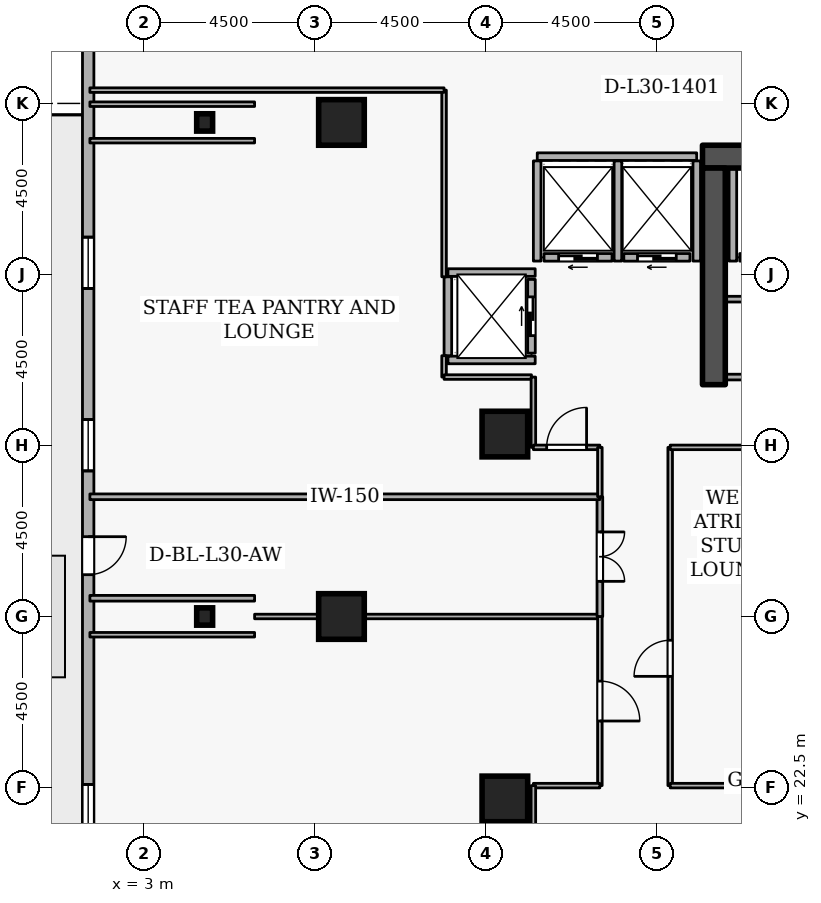
"""IFC4 building model, lengths in metres.
Left out: names, types, materials, properties, quantities, classifications, styles, units other than length and angle.
Written with IfcOpenShell. Run it as: python <this file> out.ifc"""

import sys

from ifc_helpers import new_model, si_unit, direction, frame, frame_2d, origin, origin_2d, place, context, subcontext, project, spatial, rectangle, i_section, extrude, element, fill, save


model = new_model("IFC4")
c1 = context("Model", 3, precision=1e-05, world=origin(), true_north=direction((0.0, 1.0)))
c2 = subcontext(c1, "Body", "Model", "MODEL_VIEW")
j1 = project(units=[si_unit("LENGTHUNIT", "METRE"), si_unit("PLANEANGLEUNIT", "RADIAN")], contexts=[c1])
p1 = place(None, origin())
s1 = spatial("IfcSite", under=j1, at=p1, CompositionType="ELEMENT")
p2 = place(p1, origin())
s2 = spatial("IfcBuilding", under=s1, at=p2, CompositionType="ELEMENT")
p3 = place(p2, frame((0.0, 0.0, 116.1)))
s3 = spatial("IfcBuildingStorey", under=s2, at=p3, CompositionType="ELEMENT", Elevation=116.1)
p4 = place(p3, frame((17.7, 39.1, 0.0), z_axis=(0.0, 0.0, 1.0), x_axis=(1.0, 0.0, 0.0)))
e1 = element("IfcWall", 1, at=p4, inside=s3, PredefinedType="SHEAR", context=c2, shape_type="SweptSolid", body=[
    extrude(rectangle(XDim=15.6, YDim=0.6, at=frame_2d((7.8, 0.0))), origin(), (0.0, 0.0, 1.0), 3.6),
])
p5 = place(p3, frame((18.0, 33.1, 0.0), z_axis=(0.0, 0.0, 1.0), x_axis=(0.0, 1.0, 0.0)))
e2 = element("IfcWall", 2, at=p5, inside=s3, PredefinedType="SHEAR", context=c2, shape_type="SweptSolid", body=[
    extrude(rectangle(XDim=5.7, YDim=0.6, at=frame_2d((2.85, 0.0))), origin(), (0.0, 0.0, 1.0), 3.6),
])
for number, where, z_axis, x_axis in (
    (3, (8.2, 27.0, 0.0), (0.0, 0.0, 1.0), (1.0, 0.0, 0.0)),
    (4, (8.2, 40.0, 0.0), (0.0, 0.0, 1.0), (1.0, 0.0, 0.0)),
    (5, (12.5, 22.2, 0.0), (0.0, 0.0, 1.0), (1.0, 0.0, 0.0)),
    (6, (12.5, 31.8, 0.0), (0.0, 0.0, 1.0), (1.0, 0.0, 0.0)),
):
    element("IfcColumn", number, at=place(p3, frame(where, z_axis=z_axis, x_axis=x_axis)), inside=s3, PredefinedType="COLUMN", context=c2, shape_type="SweptSolid", body=[
        extrude(rectangle(XDim=1.2, YDim=1.2, at=origin_2d()), origin(), (0.0, 0.0, 1.0), 3.6),
    ])
for number, where, z_axis, x_axis in (
    (7, (4.6, 27.0, 0.0), (0.0, 0.0, 1.0), (1.0, 0.0, 0.0)),
    (8, (4.6, 40.0, 0.0), (0.0, 0.0, 1.0), (1.0, 0.0, 0.0)),
):
    element("IfcColumn", number, at=place(p3, frame(where, z_axis=z_axis, x_axis=x_axis)), inside=s3, PredefinedType="COLUMN", context=c2, shape_type="SweptSolid", body=[
        extrude(i_section(OverallWidth=0.418, OverallDepth=0.456, WebThickness=0.042, FlangeThickness=0.067, FilletRadius=0.015, at=origin_2d()), origin(), (0.0, 0.0, 1.0), 3.6),
    ])
p6 = place(p3, frame((1.535, 48.381, 0.0), z_axis=(0.0, 0.0, 1.0), x_axis=(0.0, -1.0, 0.0)))
e9 = element("IfcWall", 9, at=p6, inside=s3, PredefinedType="STANDARD", context=c2, shape_type="SweptSolid", body=[
    extrude(rectangle(XDim=36.763, YDim=0.3, at=frame_2d((18.381, 0.0))), origin(), (0.0, 0.0, 1.0), 2.22),
])
p7 = place(p6, frame((19.281, 0.0, 0.0)))
e10 = element("IfcOpeningElement", 10, at=p7, cuts=e9, PredefinedType="OPENING", context=c2, shape_type="SweptSolid", body=[
    extrude(rectangle(XDim=1.0, YDim=2.08, at=frame_2d((0.5, 1.04))), frame((0.0, 0.16, 0.0), z_axis=(0.0, -1.0, 0.0), x_axis=(1.0, 0.0, 0.0)), (0.0, 0.0, 1.0), 0.32),
])
p8 = place(p6, frame((1.8, 0.0, 0.72)))
e11 = element("IfcOpeningElement", 11, at=p8, cuts=e9, PredefinedType="OPENING", context=c2, shape_type="SweptSolid", body=[
    extrude(rectangle(XDim=1.35, YDim=1.05, at=frame_2d((0.675, 0.525))), frame((0.0, 0.16, 0.0), z_axis=(0.0, -1.0, 0.0), x_axis=(1.0, 0.0, 0.0)), (0.0, 0.0, 1.0), 0.32),
])
p9 = place(p6, frame((11.4, 0.0, 0.72)))
e12 = element("IfcOpeningElement", 12, at=p9, cuts=e9, PredefinedType="OPENING", context=c2, shape_type="SweptSolid", body=[
    extrude(rectangle(XDim=1.35, YDim=1.05, at=frame_2d((0.675, 0.525))), frame((0.0, 0.16, 0.0), z_axis=(0.0, -1.0, 0.0), x_axis=(1.0, 0.0, 0.0)), (0.0, 0.0, 1.0), 0.32),
])
p10 = place(p6, frame((16.2, 0.0, 0.72)))
e13 = element("IfcOpeningElement", 13, at=p10, cuts=e9, PredefinedType="OPENING", context=c2, shape_type="SweptSolid", body=[
    extrude(rectangle(XDim=1.35, YDim=1.05, at=frame_2d((0.675, 0.525))), frame((0.0, 0.16, 0.0), z_axis=(0.0, -1.0, 0.0), x_axis=(1.0, 0.0, 0.0)), (0.0, 0.0, 1.0), 0.32),
])
p11 = place(p6, frame((25.8, 0.0, 0.72)))
e14 = element("IfcOpeningElement", 14, at=p11, cuts=e9, PredefinedType="OPENING", context=c2, shape_type="SweptSolid", body=[
    extrude(rectangle(XDim=1.35, YDim=1.05, at=frame_2d((0.675, 0.525))), frame((0.0, 0.16, 0.0), z_axis=(0.0, -1.0, 0.0), x_axis=(1.0, 0.0, 0.0)), (0.0, 0.0, 1.0), 0.32),
])
p12 = place(p6, frame((30.6, 0.0, 0.72)))
e15 = element("IfcOpeningElement", 15, at=p12, cuts=e9, PredefinedType="OPENING", context=c2, shape_type="SweptSolid", body=[
    extrude(rectangle(XDim=1.35, YDim=1.05, at=frame_2d((0.675, 0.525))), frame((0.0, 0.16, 0.0), z_axis=(0.0, -1.0, 0.0), x_axis=(1.0, 0.0, 0.0)), (0.0, 0.0, 1.0), 0.32),
])
p13 = place(p3, frame((20.62, 36.45, 0.0), z_axis=(0.0, 0.0, 1.0), x_axis=(-1.0, 0.0, 0.0)))
e16 = element("IfcWall", 16, at=p13, inside=s3, PredefinedType="STANDARD", context=c2, shape_type="SweptSolid", body=[
    extrude(rectangle(XDim=1.94, YDim=0.2, at=frame_2d((0.97, 0.0))), origin(), (0.0, 0.0, 1.0), 3.32),
])
p14 = place(p3, frame((17.37, 36.45, 0.0), z_axis=(0.0, 0.0, 1.0), x_axis=(-1.0, 0.0, 0.0)))
e17 = element("IfcWall", 17, at=p14, inside=s3, PredefinedType="STANDARD", context=c2, shape_type="SweptSolid", body=[
    extrude(rectangle(XDim=1.74, YDim=0.2, at=frame_2d((0.87, 0.0))), origin(), (0.0, 0.0, 1.0), 3.32),
])
p15 = place(p14, frame((0.36, 0.0, 0.0)))
e18 = element("IfcOpeningElement", 18, at=p15, cuts=e17, PredefinedType="OPENING", context=c2, shape_type="SweptSolid", body=[
    extrude(rectangle(XDim=1.02, YDim=2.06, at=frame_2d((0.51, 1.03))), frame((0.0, 0.11, 0.0), z_axis=(0.0, -1.0, 0.0), x_axis=(1.0, 0.0, 0.0)), (0.0, 0.0, 1.0), 0.22),
])
p16 = place(p3, frame((15.32, 36.45, 0.0), z_axis=(0.0, 0.0, 1.0), x_axis=(-1.0, 0.0, 0.0)))
e19 = element("IfcWall", 19, at=p16, inside=s3, PredefinedType="STANDARD", context=c2, shape_type="SweptSolid", body=[
    extrude(rectangle(XDim=1.79, YDim=0.2, at=frame_2d((0.895, 0.0))), origin(), (0.0, 0.0, 1.0), 3.32),
])
p17 = place(p16, frame((0.385, 0.0, 0.0)))
e20 = element("IfcOpeningElement", 20, at=p17, cuts=e19, PredefinedType="OPENING", context=c2, shape_type="SweptSolid", body=[
    extrude(rectangle(XDim=1.02, YDim=2.06, at=frame_2d((0.51, 1.03))), frame((0.0, 0.11, 0.0), z_axis=(0.0, -1.0, 0.0), x_axis=(1.0, 0.0, 0.0)), (0.0, 0.0, 1.0), 0.22),
])
p18 = place(p3, frame((13.2, 33.93, 0.0), z_axis=(0.0, 0.0, 1.0), x_axis=(0.0, 1.0, 0.0)))
e21 = element("IfcWall", 21, at=p18, inside=s3, PredefinedType="STANDARD", context=c2, shape_type="SweptSolid", body=[
    extrude(rectangle(XDim=1.94, YDim=0.2, at=frame_2d((0.97, 0.0))), origin(), (0.0, 0.0, 1.0), 3.32),
])
p19 = place(p18, frame((0.46, 0.0, 0.0)))
e22 = element("IfcOpeningElement", 22, at=p19, cuts=e21, PredefinedType="OPENING", context=c2, shape_type="SweptSolid", body=[
    extrude(rectangle(XDim=1.02, YDim=2.06, at=frame_2d((0.51, 1.03))), frame((0.0, 0.11, 0.0), z_axis=(0.0, -1.0, 0.0), x_axis=(1.0, 0.0, 0.0)), (0.0, 0.0, 1.0), 0.22),
])
p20 = place(p3, frame((18.5, 36.352, 0.0), z_axis=(0.0, 0.0, 1.0), x_axis=(0.0, 1.0, 0.0)))
e23 = element("IfcWall", 23, at=p20, inside=s3, PredefinedType="STANDARD", context=c2, shape_type="SweptSolid", body=[
    extrude(rectangle(XDim=2.436, YDim=0.2, at=frame_2d((1.218, 0.0))), origin(), (0.0, 0.0, 1.0), 3.32),
])
p21 = place(p3, frame((13.352, 39.1, 0.0), z_axis=(0.0, 0.0, 1.0), x_axis=(1.0, 0.0, 0.0)))
e24 = element("IfcWall", 24, at=p21, inside=s3, PredefinedType="STANDARD", context=c2, shape_type="SweptSolid", body=[
    extrude(rectangle(XDim=4.196, YDim=0.2, at=frame_2d((2.098, 0.0))), origin(), (0.0, 0.0, 1.0), 3.32),
])
p22 = place(p3, frame((17.55, 36.352, 0.0), z_axis=(0.0, 0.0, 1.0), x_axis=(0.0, 1.0, 0.0)))
e25 = element("IfcWall", 25, at=p22, inside=s3, PredefinedType="STANDARD", context=c2, shape_type="SweptSolid", body=[
    extrude(rectangle(XDim=2.636, YDim=0.2, at=frame_2d((1.318, 0.0))), origin(), (0.0, 0.0, 1.0), 2.525),
])
for number, where, z_axis, x_axis in (
    (26, (15.475, 36.352, 0.0), (0.0, 0.0, 1.0), (0.0, 1.0, 0.0)),
    (27, (13.35, 36.352, 0.0), (0.0, 0.0, 1.0), (0.0, 1.0, 0.0)),
):
    element("IfcWall", number, at=place(p3, frame(where, z_axis=z_axis, x_axis=x_axis)), inside=s3, PredefinedType="STANDARD", context=c2, shape_type="SweptSolid", body=[
        extrude(rectangle(XDim=2.636, YDim=0.2, at=frame_2d((1.318, 0.0))), origin(), (0.0, 0.0, 1.0), 3.32),
    ])
for number, where, z_axis, x_axis in (
    (28, (11.002, 36.05, 0.0), (0.0, 0.0, 1.0), (1.0, 0.0, 0.0)),
    (29, (11.002, 33.75, 0.0), (0.0, 0.0, 1.0), (1.0, 0.0, 0.0)),
):
    element("IfcWall", number, at=place(p3, frame(where, z_axis=z_axis, x_axis=x_axis)), inside=s3, PredefinedType="STANDARD", context=c2, shape_type="SweptSolid", body=[
        extrude(rectangle(XDim=2.296, YDim=0.2, at=frame_2d((1.148, 0.0))), origin(), (0.0, 0.0, 1.0), 3.32),
    ])
p23 = place(p3, frame((11.0, 33.862, 0.0), z_axis=(0.0, 0.0, 1.0), x_axis=(0.0, 1.0, 0.0)))
e30 = element("IfcWall", 30, at=p23, inside=s3, PredefinedType="STANDARD", context=c2, shape_type="SweptSolid", body=[
    extrude(rectangle(XDim=2.076, YDim=0.2, at=frame_2d((1.038, 0.0))), origin(), (0.0, 0.0, 1.0), 3.32),
])
p24 = place(p3, frame((18.3, 33.3, 0.0), z_axis=(0.0, 0.0, 1.0), x_axis=(1.0, 0.0, 0.0)))
e31 = element("IfcWall", 31, at=p24, inside=s3, PredefinedType="PARTITIONING", context=c2, shape_type="SweptSolid", body=[
    extrude(rectangle(XDim=3.3, YDim=0.15, at=frame_2d((1.65, 0.0))), origin(), (0.0, 0.0, 1.0), 3.32),
])
p25 = place(p24, frame((1.19, 0.0, 0.0)))
e32 = element("IfcOpeningElement", 32, at=p25, cuts=e31, PredefinedType="OPENING", context=c2, shape_type="SweptSolid", body=[
    extrude(rectangle(XDim=0.92, YDim=2.08, at=frame_2d((0.46, 1.04))), frame((0.0, 0.085, 0.0), z_axis=(0.0, -1.0, 0.0), x_axis=(1.0, 0.0, 0.0)), (0.0, 0.0, 1.0), 0.17),
])
p26 = place(p3, frame((21.6, 35.35, 0.0), z_axis=(0.0, 0.0, 1.0), x_axis=(-1.0, 0.0, 0.0)))
e33 = element("IfcWall", 33, at=p26, inside=s3, PredefinedType="PARTITIONING", context=c2, shape_type="SweptSolid", body=[
    extrude(rectangle(XDim=3.3, YDim=0.15, at=frame_2d((1.65, 0.0))), origin(), (0.0, 0.0, 1.0), 3.32),
])
p27 = place(p3, frame((1.58, 26.52, 0.0), z_axis=(0.0, 0.0, 1.0), x_axis=(1.0, 0.0, 0.0)))
e34 = element("IfcWall", 34, at=p27, inside=s3, PredefinedType="PARTITIONING", context=c2, shape_type="SweptSolid", body=[
    extrude(rectangle(XDim=4.334, YDim=0.12, at=frame_2d((2.167, 0.0))), origin(), (0.0, 0.0, 1.0), 1.685),
])
p28 = place(p3, frame((5.914, 27.0, 0.0), z_axis=(0.0, 0.0, 1.0), x_axis=(1.0, 0.0, 0.0)))
e35 = element("IfcWall", 35, at=p28, inside=s3, PredefinedType="PARTITIONING", context=c2, shape_type="SweptSolid", body=[
    extrude(rectangle(XDim=9.086, YDim=0.12, at=frame_2d((4.543, 0.0))), origin(), (0.0, 0.0, 1.0), 1.685),
])
p29 = place(p3, frame((15.0, 27.0, 0.0), z_axis=(0.0, 0.0, 1.0), x_axis=(0.0, -1.0, 0.0)))
e36 = element("IfcWall", 36, at=p29, inside=s3, PredefinedType="PARTITIONING", context=c2, shape_type="SweptSolid", body=[
    extrude(rectangle(XDim=4.45, YDim=0.12, at=frame_2d((2.225, 0.0))), origin(), (0.0, 0.0, 1.0), 3.32),
])
p30 = place(p29, frame((1.7, 0.0, 0.0)))
e37 = element("IfcOpeningElement", 37, at=p30, cuts=e36, PredefinedType="OPENING", context=c2, shape_type="SweptSolid", body=[
    extrude(rectangle(XDim=1.05, YDim=2.1, at=frame_2d((0.525, 1.05))), frame((0.0, 0.07, 0.0), z_axis=(0.0, -1.0, 0.0), x_axis=(1.0, 0.0, 0.0)), (0.0, 0.0, 1.0), 0.14),
])
p31 = place(p3, frame((15.0, 22.55, 0.0), z_axis=(0.0, 0.0, 1.0), x_axis=(-1.0, 0.0, 0.0)))
e38 = element("IfcWall", 38, at=p31, inside=s3, PredefinedType="PARTITIONING", context=c2, shape_type="SweptSolid", body=[
    extrude(rectangle(XDim=1.75, YDim=0.12, at=frame_2d((0.875, 0.0))), origin(), (0.0, 0.0, 1.0), 3.32),
])
p32 = place(p3, frame((13.25, 22.55, 0.0), z_axis=(0.0, 0.0, 1.0), x_axis=(0.0, -1.0, 0.0)))
e39 = element("IfcWall", 39, at=p32, inside=s3, PredefinedType="PARTITIONING", context=c2, shape_type="SweptSolid", body=[
    extrude(rectangle(XDim=1.85, YDim=0.12, at=frame_2d((0.925, 0.0))), origin(), (0.0, 0.0, 1.0), 3.32),
])
p33 = place(p3, frame((15.0, 30.15, 0.0), z_axis=(0.0, 0.0, 1.0), x_axis=(0.0, -1.0, 0.0)))
e40 = element("IfcWall", 40, at=p33, inside=s3, PredefinedType="PARTITIONING", context=c2, shape_type="SweptSolid", body=[
    extrude(rectangle(XDim=3.15, YDim=0.15, at=frame_2d((1.575, 0.0))), origin(), (0.0, 0.0, 1.0), 3.32),
])
p34 = place(p33, frame((0.925, 0.0, 0.0)))
e41 = element("IfcOpeningElement", 41, at=p34, cuts=e40, PredefinedType="OPENING", context=c2, shape_type="SweptSolid", body=[
    extrude(rectangle(XDim=1.3, YDim=2.12, at=frame_2d((0.65, 1.06))), frame((0.0, 0.085, 0.0), z_axis=(0.0, -1.0, 0.0), x_axis=(1.0, 0.0, 0.0)), (0.0, 0.0, 1.0), 0.17),
])
p35 = place(p3, frame((5.914, 27.48, 0.0), z_axis=(0.0, 0.0, 1.0), x_axis=(-1.0, 0.0, 0.0)))
e42 = element("IfcWall", 42, at=p35, inside=s3, PredefinedType="PARTITIONING", context=c2, shape_type="SweptSolid", body=[
    extrude(rectangle(XDim=4.334, YDim=0.15, at=frame_2d((2.167, 0.0))), origin(), (0.0, 0.0, 1.0), 1.685),
])
p36 = place(p3, frame((1.58, 30.15, 0.0), z_axis=(0.0, 0.0, 1.0), x_axis=(1.0, 0.0, 0.0)))
e43 = element("IfcWall", 43, at=p36, inside=s3, PredefinedType="PARTITIONING", context=c2, shape_type="SweptSolid", body=[
    extrude(rectangle(XDim=13.42, YDim=0.15, at=frame_2d((6.71, 0.0))), origin(), (0.0, 0.0, 1.0), 3.32),
])
p37 = place(p3, frame((10.9, 40.85, 0.0), z_axis=(0.0, 0.0, 1.0), x_axis=(0.0, -1.0, 0.0)))
e44 = element("IfcWall", 44, at=p37, inside=s3, PredefinedType="PARTITIONING", context=c2, shape_type="SweptSolid", body=[
    extrude(rectangle(XDim=4.912, YDim=0.12, at=frame_2d((2.456, 0.0))), origin(), (0.0, 0.0, 1.0), 3.32),
])
p38 = place(p3, frame((10.9, 33.862, 0.0), z_axis=(0.0, 0.0, 1.0), x_axis=(0.0, -1.0, 0.0)))
e45 = element("IfcWall", 45, at=p38, inside=s3, PredefinedType="PARTITIONING", context=c2, shape_type="SweptSolid", body=[
    extrude(rectangle(XDim=0.562, YDim=0.12, at=frame_2d((0.281, 0.0))), origin(), (0.0, 0.0, 1.0), 3.32),
])
p39 = place(p3, frame((10.9, 33.3, 0.0), z_axis=(0.0, 0.0, 1.0), x_axis=(1.0, 0.0, 0.0)))
e46 = element("IfcWall", 46, at=p39, inside=s3, PredefinedType="PARTITIONING", context=c2, shape_type="SweptSolid", body=[
    extrude(rectangle(XDim=2.3, YDim=0.12, at=frame_2d((1.15, 0.0))), origin(), (0.0, 0.0, 1.0), 3.32),
])
p40 = place(p3, frame((13.25, 33.3, 0.0), z_axis=(0.0, 0.0, 1.0), x_axis=(0.0, -1.0, 0.0)))
e47 = element("IfcWall", 47, at=p40, inside=s3, PredefinedType="PARTITIONING", context=c2, shape_type="SweptSolid", body=[
    extrude(rectangle(XDim=1.85, YDim=0.12, at=frame_2d((0.925, 0.0))), origin(), (0.0, 0.0, 1.0), 3.32),
])
p41 = place(p3, frame((13.25, 31.45, 0.0), z_axis=(0.0, 0.0, 1.0), x_axis=(1.0, 0.0, 0.0)))
e48 = element("IfcWall", 48, at=p41, inside=s3, PredefinedType="PARTITIONING", context=c2, shape_type="SweptSolid", body=[
    extrude(rectangle(XDim=1.75, YDim=0.12, at=frame_2d((0.875, 0.0))), origin(), (0.0, 0.0, 1.0), 3.32),
])
p42 = place(p41, frame((0.35, 0.0, 0.0)))
e49 = element("IfcOpeningElement", 49, at=p42, cuts=e48, PredefinedType="OPENING", context=c2, shape_type="SweptSolid", body=[
    extrude(rectangle(XDim=1.05, YDim=2.1, at=frame_2d((0.525, 1.05))), frame((0.0, 0.07, 0.0), z_axis=(0.0, -1.0, 0.0), x_axis=(1.0, 0.0, 0.0)), (0.0, 0.0, 1.0), 0.14),
])
p43 = place(p3, frame((15.0, 31.45, 0.0), z_axis=(0.0, 0.0, 1.0), x_axis=(0.0, -1.0, 0.0)))
e50 = element("IfcWall", 50, at=p43, inside=s3, PredefinedType="PARTITIONING", context=c2, shape_type="SweptSolid", body=[
    extrude(rectangle(XDim=1.3, YDim=0.12, at=frame_2d((0.65, 0.0))), origin(), (0.0, 0.0, 1.0), 3.32),
])
for number, where, z_axis, x_axis in (
    (51, (1.58, 39.52, 0.0), (0.0, 0.0, 1.0), (1.0, 0.0, 0.0)),
    (52, (5.914, 40.48, 0.0), (0.0, 0.0, 1.0), (-1.0, 0.0, 0.0)),
):
    element("IfcWall", number, at=place(p3, frame(where, z_axis=z_axis, x_axis=x_axis)), inside=s3, PredefinedType="PARTITIONING", context=c2, shape_type="SweptSolid", body=[
        extrude(rectangle(XDim=4.334, YDim=0.12, at=frame_2d((2.167, 0.0))), origin(), (0.0, 0.0, 1.0), 1.685),
    ])
p44 = place(p3, frame((1.58, 40.85, 0.0), z_axis=(0.0, 0.0, 1.0), x_axis=(1.0, 0.0, 0.0)))
e53 = element("IfcWall", 53, at=p44, inside=s3, PredefinedType="PARTITIONING", context=c2, shape_type="SweptSolid", body=[
    extrude(rectangle(XDim=9.32, YDim=0.12, at=frame_2d((4.66, 0.0))), origin(), (0.0, 0.0, 1.0), 3.32),
])
p45 = place(p3, frame((16.85, 22.55, 0.0), z_axis=(0.0, 0.0, 1.0), x_axis=(0.0, 1.0, 0.0)))
e54 = element("IfcWall", 54, at=p45, inside=s3, PredefinedType="PARTITIONING", context=c2, shape_type="SweptSolid", body=[
    extrude(rectangle(XDim=8.9, YDim=0.12, at=frame_2d((4.45, 0.0))), origin(), (0.0, 0.0, 1.0), 3.32),
])
p46 = place(p45, frame((2.875, 0.0, 0.0)))
e55 = element("IfcOpeningElement", 55, at=p46, cuts=e54, PredefinedType="OPENING", context=c2, shape_type="SweptSolid", body=[
    extrude(rectangle(XDim=0.95, YDim=2.1, at=frame_2d((0.475, 1.05))), frame((0.0, 0.07, 0.0), z_axis=(0.0, -1.0, 0.0), x_axis=(1.0, 0.0, 0.0)), (0.0, 0.0, 1.0), 0.14),
])
for number, where, z_axis, x_axis in (
    (56, (16.85, 31.45, 0.0), (0.0, 0.0, 1.0), (1.0, 0.0, 0.0)),
    (57, (20.3, 22.55, 0.0), (0.0, 0.0, 1.0), (-1.0, 0.0, 0.0)),
):
    element("IfcWall", number, at=place(p3, frame(where, z_axis=z_axis, x_axis=x_axis)), inside=s3, PredefinedType="PARTITIONING", context=c2, shape_type="SweptSolid", body=[
        extrude(rectangle(XDim=3.45, YDim=0.12, at=frame_2d((1.725, 0.0))), origin(), (0.0, 0.0, 1.0), 3.32),
    ])
p47 = place(p7, origin())
e58 = element("IfcDoor", 58, at=p47, inside=s3, OperationType="SINGLE_SWING_LEFT", PredefinedType="DOOR", context=c2, shape_type="SweptSolid", body=[
    extrude(rectangle(XDim=1.0, YDim=2.08, at=frame_2d((0.5, 1.04))), frame((0.0, 0.025, 0.0), z_axis=(0.0, -1.0, 0.0), x_axis=(1.0, 0.0, 0.0)), (0.0, 0.0, 1.0), 0.05),
])
fill(e10, e58)
p48 = place(p9, origin())
e59 = element("IfcWindow", 59, at=p48, inside=s3, PartitioningType="SINGLE_PANEL", PredefinedType="WINDOW", context=c2, shape_type="SweptSolid", body=[
    extrude(rectangle(XDim=1.35, YDim=1.05, at=frame_2d((0.675, 0.525))), frame((0.0, 0.03, 0.0), z_axis=(0.0, -1.0, 0.0), x_axis=(1.0, 0.0, 0.0)), (0.0, 0.0, 1.0), 0.06),
])
fill(e12, e59)
p49 = place(p10, origin())
e60 = element("IfcWindow", 60, at=p49, inside=s3, PartitioningType="SINGLE_PANEL", PredefinedType="WINDOW", context=c2, shape_type="SweptSolid", body=[
    extrude(rectangle(XDim=1.35, YDim=1.05, at=frame_2d((0.675, 0.525))), frame((0.0, 0.03, 0.0), z_axis=(0.0, -1.0, 0.0), x_axis=(1.0, 0.0, 0.0)), (0.0, 0.0, 1.0), 0.06),
])
fill(e13, e60)
p50 = place(p11, origin())
e61 = element("IfcWindow", 61, at=p50, inside=s3, PartitioningType="SINGLE_PANEL", PredefinedType="WINDOW", context=c2, shape_type="SweptSolid", body=[
    extrude(rectangle(XDim=1.35, YDim=1.05, at=frame_2d((0.675, 0.525))), frame((0.0, 0.03, 0.0), z_axis=(0.0, -1.0, 0.0), x_axis=(1.0, 0.0, 0.0)), (0.0, 0.0, 1.0), 0.06),
])
fill(e14, e61)
p51 = place(p15, origin())
e62 = element("IfcDoor", 62, at=p51, inside=s3, OperationType="SLIDING_TO_LEFT", PredefinedType="DOOR", context=c2, shape_type="SweptSolid", body=[
    extrude(rectangle(XDim=1.02, YDim=2.06, at=frame_2d((0.51, 1.03))), frame((0.0, 0.025, 0.0), z_axis=(0.0, -1.0, 0.0), x_axis=(1.0, 0.0, 0.0)), (0.0, 0.0, 1.0), 0.05),
])
fill(e18, e62)
p52 = place(p17, origin())
e63 = element("IfcDoor", 63, at=p52, inside=s3, OperationType="SLIDING_TO_LEFT", PredefinedType="DOOR", context=c2, shape_type="SweptSolid", body=[
    extrude(rectangle(XDim=1.02, YDim=2.06, at=frame_2d((0.51, 1.03))), frame((0.0, 0.025, 0.0), z_axis=(0.0, -1.0, 0.0), x_axis=(1.0, 0.0, 0.0)), (0.0, 0.0, 1.0), 0.05),
])
fill(e20, e63)
p53 = place(p19, origin())
e64 = element("IfcDoor", 64, at=p53, inside=s3, OperationType="SLIDING_TO_LEFT", PredefinedType="DOOR", context=c2, shape_type="SweptSolid", body=[
    extrude(rectangle(XDim=1.02, YDim=2.06, at=frame_2d((0.51, 1.03))), frame((0.0, 0.025, 0.0), z_axis=(0.0, -1.0, 0.0), x_axis=(1.0, 0.0, 0.0)), (0.0, 0.0, 1.0), 0.05),
])
fill(e22, e64)
p54 = place(p30, origin())
e65 = element("IfcDoor", 65, at=p54, inside=s3, OperationType="SINGLE_SWING_RIGHT", PredefinedType="DOOR", context=c2, shape_type="SweptSolid", body=[
    extrude(rectangle(XDim=1.05, YDim=2.1, at=frame_2d((0.525, 1.05))), frame((0.0, 0.025, 0.0), z_axis=(0.0, -1.0, 0.0), x_axis=(1.0, 0.0, 0.0)), (0.0, 0.0, 1.0), 0.05),
])
fill(e37, e65)
p55 = place(p34, origin())
e66 = element("IfcDoor", 66, at=p55, inside=s3, OperationType="DOUBLE_DOOR_SINGLE_SWING", PredefinedType="DOOR", context=c2, shape_type="SweptSolid", body=[
    extrude(rectangle(XDim=1.3, YDim=2.12, at=frame_2d((0.65, 1.06))), frame((0.0, 0.025, 0.0), z_axis=(0.0, -1.0, 0.0), x_axis=(1.0, 0.0, 0.0)), (0.0, 0.0, 1.0), 0.05),
])
fill(e41, e66)
p56 = place(p42, origin())
e67 = element("IfcDoor", 67, at=p56, inside=s3, OperationType="SINGLE_SWING_RIGHT", PredefinedType="DOOR", context=c2, shape_type="SweptSolid", body=[
    extrude(rectangle(XDim=1.05, YDim=2.1, at=frame_2d((0.525, 1.05))), frame((0.0, 0.025, 0.0), z_axis=(0.0, -1.0, 0.0), x_axis=(1.0, 0.0, 0.0)), (0.0, 0.0, 1.0), 0.05),
])
fill(e49, e67)
p57 = place(p46, origin())
e68 = element("IfcDoor", 68, at=p57, inside=s3, OperationType="SINGLE_SWING_LEFT", PredefinedType="DOOR", context=c2, shape_type="SweptSolid", body=[
    extrude(rectangle(XDim=0.95, YDim=2.1, at=frame_2d((0.475, 1.05))), frame((0.0, 0.025, 0.0), z_axis=(0.0, -1.0, 0.0), x_axis=(1.0, 0.0, 0.0)), (0.0, 0.0, 1.0), 0.05),
])
fill(e55, e68)
save(model, sys.argv[1])
